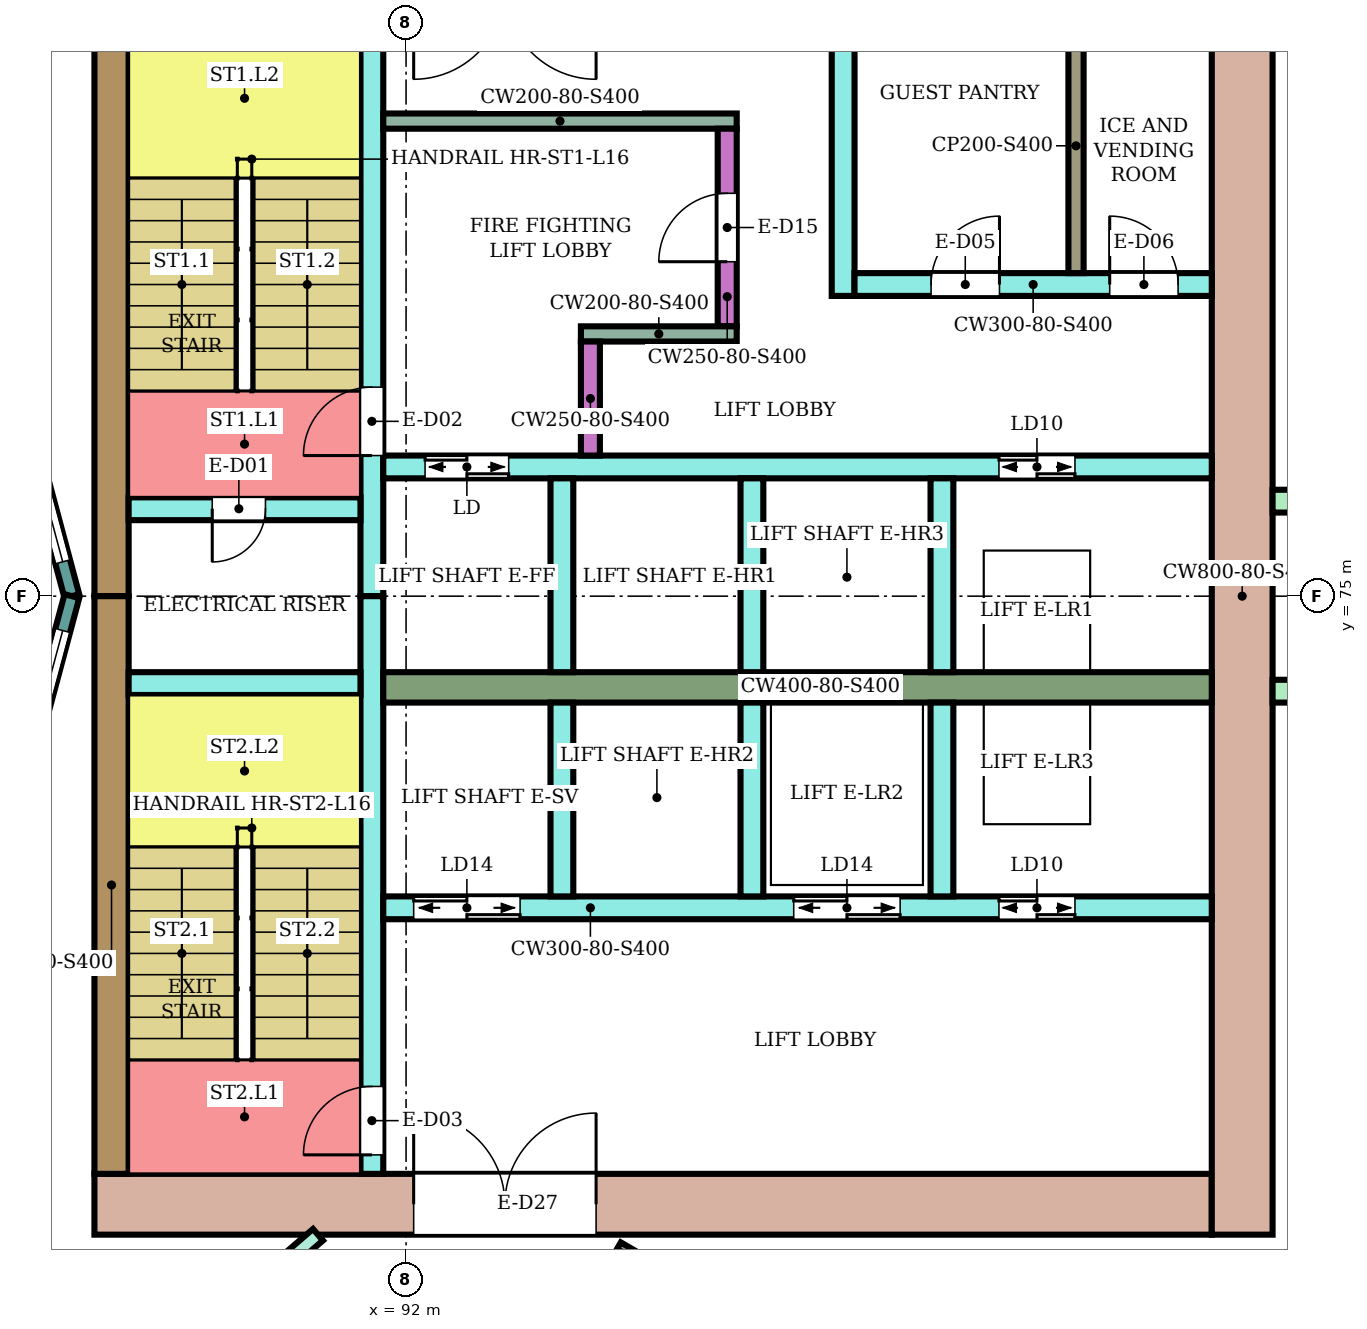
"""IFC4 building model, lengths in metres.
Left out: names, types, materials, properties, quantities, classifications, styles, units other than length and angle.
Written with IfcOpenShell. Run it as: python <this file> out.ifc"""

import sys

from ifc_helpers import new_model, si_unit, direction, frame, frame_2d, origin, place, context, subcontext, project, spatial, rectangle, extrude, element, fill, save


model = new_model("IFC4")
c1 = context("Model", 3, precision=1e-05, world=origin(), true_north=direction((0.0, 1.0)))
c2 = subcontext(c1, "Body", "Model", "MODEL_VIEW")
j1 = project(units=[si_unit("LENGTHUNIT", "METRE"), si_unit("PLANEANGLEUNIT", "RADIAN")], contexts=[c1])
p1 = place(None, origin())
s1 = spatial("IfcSite", under=j1, at=p1, CompositionType="ELEMENT")
p2 = place(p1, origin())
s2 = spatial("IfcBuilding", under=s1, at=p2, CompositionType="ELEMENT")
p3 = place(p2, frame((0.0, 0.0, 70.6)))
s3 = spatial("IfcBuildingStorey", under=s2, at=p3, CompositionType="ELEMENT", Elevation=70.6)
p4 = place(p3, frame((87.9, 67.0, 0.0), z_axis=(0.0, 0.0, 1.0), x_axis=(1.0, 0.0, 0.0)))
e1 = element("IfcWall", 1, at=p4, inside=s3, PredefinedType="SHEAR", context=c2, shape_type="SweptSolid", body=[
    extrude(rectangle(XDim=14.7, YDim=0.8, at=frame_2d((7.35, 0.0))), origin(), (0.0, 0.0, 1.0), 3.4),
])
p5 = place(p4, frame((4.2, 0.0, 0.0)))
e2 = element("IfcOpeningElement", 2, at=p5, cuts=e1, PredefinedType="OPENING", context=c2, shape_type="SweptSolid", body=[
    extrude(rectangle(XDim=2.4, YDim=2.4, at=frame_2d((1.2, 1.2))), frame((0.0, 0.41, 0.0), z_axis=(0.0, -1.0, 0.0), x_axis=(1.0, 0.0, 0.0)), (0.0, 0.0, 1.0), 0.82),
])
for number, where, z_axis, x_axis in (
    (3, (88.125, 75.0, 0.0), (0.0, 0.0, 1.0), (0.0, 1.0, 0.0)),
    (4, (88.125, 67.4, 0.0), (0.0, 0.0, 1.0), (0.0, 1.0, 0.0)),
):
    element("IfcWall", number, at=place(p3, frame(where, z_axis=z_axis, x_axis=x_axis)), inside=s3, PredefinedType="SHEAR", context=c2, shape_type="SweptSolid", body=[
        extrude(rectangle(XDim=7.6, YDim=0.45, at=frame_2d((3.8, 0.0))), origin(), (0.0, 0.0, 1.0), 3.4),
    ])
p6 = place(p3, frame((103.0, 66.6, 0.0), z_axis=(0.0, 0.0, 1.0), x_axis=(0.0, 1.0, 0.0)))
e5 = element("IfcWall", 5, at=p6, inside=s3, PredefinedType="SHEAR", context=c2, shape_type="SweptSolid", body=[
    extrude(rectangle(XDim=16.8, YDim=0.8, at=frame_2d((8.4, 0.0))), origin(), (0.0, 0.0, 1.0), 3.4),
])
p7 = place(p3, frame((91.55, 75.0, 0.0), z_axis=(0.0, 0.0, 1.0), x_axis=(0.0, 1.0, 0.0)))
e6 = element("IfcWall", 6, at=p7, inside=s3, PredefinedType="SHEAR", context=c2, shape_type="SweptSolid", body=[
    extrude(rectangle(XDim=7.6, YDim=0.3, at=frame_2d((3.8, 0.0))), origin(), (0.0, 0.0, 1.0), 3.4),
])
p8 = place(p7, frame((1.85, 0.0, 0.0)))
e7 = element("IfcOpeningElement", 7, at=p8, cuts=e6, PredefinedType="OPENING", context=c2, shape_type="SweptSolid", body=[
    extrude(rectangle(XDim=0.9, YDim=2.1, at=frame_2d((0.45, 1.05))), frame((0.0, 0.16, 0.0), z_axis=(0.0, -1.0, 0.0), x_axis=(1.0, 0.0, 0.0)), (0.0, 0.0, 1.0), 0.32),
])
p9 = place(p3, frame((91.55, 67.4, 0.0), z_axis=(0.0, 0.0, 1.0), x_axis=(0.0, 1.0, 0.0)))
e8 = element("IfcWall", 8, at=p9, inside=s3, PredefinedType="SHEAR", context=c2, shape_type="SweptSolid", body=[
    extrude(rectangle(XDim=7.6, YDim=0.3, at=frame_2d((3.8, 0.0))), origin(), (0.0, 0.0, 1.0), 3.4),
])
p10 = place(p9, frame((0.25, 0.0, 0.0)))
e9 = element("IfcOpeningElement", 9, at=p10, cuts=e8, PredefinedType="OPENING", context=c2, shape_type="SweptSolid", body=[
    extrude(rectangle(XDim=0.9, YDim=2.1, at=frame_2d((0.45, 1.05))), frame((0.0, 0.16, 0.0), z_axis=(0.0, -1.0, 0.0), x_axis=(1.0, 0.0, 0.0)), (0.0, 0.0, 1.0), 0.32),
])
p11 = place(p3, frame((88.35, 76.15, 0.0), z_axis=(0.0, 0.0, 1.0), x_axis=(1.0, 0.0, 0.0)))
e10 = element("IfcWall", 10, at=p11, inside=s3, PredefinedType="SHEAR", context=c2, shape_type="SweptSolid", body=[
    extrude(rectangle(XDim=3.05, YDim=0.3, at=frame_2d((1.525, 0.0))), origin(), (0.0, 0.0, 1.0), 3.4),
])
p12 = place(p11, frame((1.1, 0.0, 0.0)))
e11 = element("IfcOpeningElement", 11, at=p12, cuts=e10, PredefinedType="OPENING", context=c2, shape_type="SweptSolid", body=[
    extrude(rectangle(XDim=0.7, YDim=2.0, at=frame_2d((0.35, 1.0))), frame((0.0, 0.16, 0.0), z_axis=(0.0, -1.0, 0.0), x_axis=(1.0, 0.0, 0.0)), (0.0, 0.0, 1.0), 0.32),
])
p13 = place(p3, frame((88.35, 73.85, 0.0), z_axis=(0.0, 0.0, 1.0), x_axis=(1.0, 0.0, 0.0)))
e12 = element("IfcWall", 12, at=p13, inside=s3, PredefinedType="SHEAR", context=c2, shape_type="SweptSolid", body=[
    extrude(rectangle(XDim=3.05, YDim=0.3, at=frame_2d((1.525, 0.0))), origin(), (0.0, 0.0, 1.0), 3.4),
])
p14 = place(p3, frame((91.7, 76.7, 0.0), z_axis=(0.0, 0.0, 1.0), x_axis=(1.0, 0.0, 0.0)))
e13 = element("IfcWall", 13, at=p14, inside=s3, PredefinedType="SHEAR", context=c2, shape_type="SweptSolid", body=[
    extrude(rectangle(XDim=10.9, YDim=0.3, at=frame_2d((5.45, 0.0))), origin(), (0.0, 0.0, 1.0), 3.4),
])
p15 = place(p14, frame((0.55, 0.0, 0.0)))
e14 = element("IfcOpeningElement", 14, at=p15, cuts=e13, PredefinedType="OPENING", context=c2, shape_type="SweptSolid", body=[
    extrude(rectangle(XDim=1.1, YDim=2.1, at=frame_2d((0.55, 1.05))), frame((0.0, 0.16, 0.0), z_axis=(0.0, -1.0, 0.0), x_axis=(1.0, 0.0, 0.0)), (0.0, 0.0, 1.0), 0.32),
])
p16 = place(p14, frame((8.1, 0.0, 0.0)))
e15 = element("IfcOpeningElement", 15, at=p16, cuts=e13, PredefinedType="OPENING", context=c2, shape_type="SweptSolid", body=[
    extrude(rectangle(XDim=1.0, YDim=2.1, at=frame_2d((0.5, 1.05))), frame((0.0, 0.16, 0.0), z_axis=(0.0, -1.0, 0.0), x_axis=(1.0, 0.0, 0.0)), (0.0, 0.0, 1.0), 0.32),
])
p17 = place(p3, frame((91.7, 73.8, 0.0), z_axis=(0.0, 0.0, 1.0), x_axis=(1.0, 0.0, 0.0)))
e16 = element("IfcWall", 16, at=p17, inside=s3, PredefinedType="SHEAR", context=c2, shape_type="SweptSolid", body=[
    extrude(rectangle(XDim=10.9, YDim=0.4, at=frame_2d((5.45, 0.0))), origin(), (0.0, 0.0, 1.0), 3.4),
])
p18 = place(p3, frame((91.7, 70.9, 0.0), z_axis=(0.0, 0.0, 1.0), x_axis=(1.0, 0.0, 0.0)))
e17 = element("IfcWall", 17, at=p18, inside=s3, PredefinedType="SHEAR", context=c2, shape_type="SweptSolid", body=[
    extrude(rectangle(XDim=10.9, YDim=0.3, at=frame_2d((5.45, 0.0))), origin(), (0.0, 0.0, 1.0), 3.4),
])
p19 = place(p18, frame((0.4, 0.0, 0.0)))
e18 = element("IfcOpeningElement", 18, at=p19, cuts=e17, PredefinedType="OPENING", context=c2, shape_type="SweptSolid", body=[
    extrude(rectangle(XDim=1.4, YDim=2.1, at=frame_2d((0.7, 1.05))), frame((0.0, 0.16, 0.0), z_axis=(0.0, -1.0, 0.0), x_axis=(1.0, 0.0, 0.0)), (0.0, 0.0, 1.0), 0.32),
])
p20 = place(p18, frame((5.4, 0.0, 0.0)))
e19 = element("IfcOpeningElement", 19, at=p20, cuts=e17, PredefinedType="OPENING", context=c2, shape_type="SweptSolid", body=[
    extrude(rectangle(XDim=1.4, YDim=2.1, at=frame_2d((0.7, 1.05))), frame((0.0, 0.16, 0.0), z_axis=(0.0, -1.0, 0.0), x_axis=(1.0, 0.0, 0.0)), (0.0, 0.0, 1.0), 0.32),
])
p21 = place(p18, frame((8.1, 0.0, 0.0)))
e20 = element("IfcOpeningElement", 20, at=p21, cuts=e17, PredefinedType="OPENING", context=c2, shape_type="SweptSolid", body=[
    extrude(rectangle(XDim=1.0, YDim=2.1, at=frame_2d((0.5, 1.05))), frame((0.0, 0.16, 0.0), z_axis=(0.0, -1.0, 0.0), x_axis=(1.0, 0.0, 0.0)), (0.0, 0.0, 1.0), 0.32),
])
for number, where, z_axis, x_axis in (
    (21, (94.05, 74.0, 0.0), (0.0, 0.0, 1.0), (0.0, 1.0, 0.0)),
    (22, (96.55, 74.0, 0.0), (0.0, 0.0, 1.0), (0.0, 1.0, 0.0)),
    (23, (99.05, 74.0, 0.0), (0.0, 0.0, 1.0), (0.0, 1.0, 0.0)),
    (24, (94.05, 71.05, 0.0), (0.0, 0.0, 1.0), (0.0, 1.0, 0.0)),
    (25, (96.55, 71.05, 0.0), (0.0, 0.0, 1.0), (0.0, 1.0, 0.0)),
    (26, (99.05, 71.05, 0.0), (0.0, 0.0, 1.0), (0.0, 1.0, 0.0)),
):
    element("IfcWall", number, at=place(p3, frame(where, z_axis=z_axis, x_axis=x_axis)), inside=s3, PredefinedType="SHEAR", context=c2, shape_type="SweptSolid", body=[
        extrude(rectangle(XDim=2.55, YDim=0.3, at=frame_2d((1.275, 0.0))), origin(), (0.0, 0.0, 1.0), 3.4),
    ])
p22 = place(p3, frame((91.7, 81.25, 0.0), z_axis=(0.0, 0.0, 1.0), x_axis=(1.0, 0.0, 0.0)))
e27 = element("IfcWall", 27, at=p22, inside=s3, PredefinedType="SHEAR", context=c2, shape_type="SweptSolid", body=[
    extrude(rectangle(XDim=4.65, YDim=0.2, at=frame_2d((2.325, 0.0))), origin(), (0.0, 0.0, 1.0), 3.4),
])
p23 = place(p3, frame((96.225, 78.55, 0.0), z_axis=(0.0, 0.0, 1.0), x_axis=(0.0, 1.0, 0.0)))
e28 = element("IfcWall", 28, at=p23, inside=s3, PredefinedType="SHEAR", context=c2, shape_type="SweptSolid", body=[
    extrude(rectangle(XDim=2.6, YDim=0.25, at=frame_2d((1.3, 0.0))), origin(), (0.0, 0.0, 1.0), 3.4),
])
p24 = place(p23, frame((0.85, 0.0, 0.0)))
e29 = element("IfcOpeningElement", 29, at=p24, cuts=e28, PredefinedType="OPENING", context=c2, shape_type="SweptSolid", body=[
    extrude(rectangle(XDim=0.9, YDim=2.1, at=frame_2d((0.45, 1.05))), frame((0.0, 0.135, 0.0), z_axis=(0.0, -1.0, 0.0), x_axis=(1.0, 0.0, 0.0)), (0.0, 0.0, 1.0), 0.27),
])
p25 = place(p3, frame((94.3, 78.45, 0.0), z_axis=(0.0, 0.0, 1.0), x_axis=(1.0, 0.0, 0.0)))
e30 = element("IfcWall", 30, at=p25, inside=s3, PredefinedType="SHEAR", context=c2, shape_type="SweptSolid", body=[
    extrude(rectangle(XDim=2.05, YDim=0.2, at=frame_2d((1.025, 0.0))), origin(), (0.0, 0.0, 1.0), 3.4),
])
p26 = place(p3, frame((94.425, 76.85, 0.0), z_axis=(0.0, 0.0, 1.0), x_axis=(0.0, 1.0, 0.0)))
e31 = element("IfcWall", 31, at=p26, inside=s3, PredefinedType="SHEAR", context=c2, shape_type="SweptSolid", body=[
    extrude(rectangle(XDim=1.5, YDim=0.25, at=frame_2d((0.75, 0.0))), origin(), (0.0, 0.0, 1.0), 3.4),
])
p27 = place(p3, frame((97.75, 78.95, 0.0), z_axis=(0.0, 0.0, 1.0), x_axis=(0.0, 1.0, 0.0)))
e32 = element("IfcWall", 32, at=p27, inside=s3, PredefinedType="SHEAR", context=c2, shape_type="SweptSolid", body=[
    extrude(rectangle(XDim=3.65, YDim=0.3, at=frame_2d((1.825, 0.0))), origin(), (0.0, 0.0, 1.0), 3.4),
])
p28 = place(p3, frame((97.9, 79.1, 0.0), z_axis=(0.0, 0.0, 1.0), x_axis=(1.0, 0.0, 0.0)))
e33 = element("IfcWall", 33, at=p28, inside=s3, PredefinedType="SHEAR", context=c2, shape_type="SweptSolid", body=[
    extrude(rectangle(XDim=4.7, YDim=0.3, at=frame_2d((2.35, 0.0))), origin(), (0.0, 0.0, 1.0), 3.4),
])
p29 = place(p28, frame((1.007, 0.0, 0.0)))
e34 = element("IfcOpeningElement", 34, at=p29, cuts=e33, PredefinedType="OPENING", context=c2, shape_type="SweptSolid", body=[
    extrude(rectangle(XDim=0.9, YDim=2.1, at=frame_2d((0.45, 1.05))), frame((0.0, 0.16, 0.0), z_axis=(0.0, -1.0, 0.0), x_axis=(1.0, 0.0, 0.0)), (0.0, 0.0, 1.0), 0.32),
])
p30 = place(p28, frame((3.357, 0.0, 0.0)))
e35 = element("IfcOpeningElement", 35, at=p30, cuts=e33, PredefinedType="OPENING", context=c2, shape_type="SweptSolid", body=[
    extrude(rectangle(XDim=0.9, YDim=2.1, at=frame_2d((0.45, 1.05))), frame((0.0, 0.16, 0.0), z_axis=(0.0, -1.0, 0.0), x_axis=(1.0, 0.0, 0.0)), (0.0, 0.0, 1.0), 0.32),
])
for number, where, z_axis, x_axis in (
    (36, (103.4, 73.75, 0.0), (0.0, 0.0, 1.0), (1.0, 0.0, 0.0)),
    (37, (103.4, 76.25, 0.0), (0.0, 0.0, 1.0), (1.0, 0.0, 0.0)),
):
    element("IfcWall", number, at=place(p3, frame(where, z_axis=z_axis, x_axis=x_axis)), inside=s3, PredefinedType="NOTDEFINED", context=c2, shape_type="SweptSolid", body=[
        extrude(rectangle(XDim=2.416, YDim=0.3, at=frame_2d((1.208, 0.0))), origin(), (0.0, 0.0, 1.0), 3.8),
    ])
p31 = place(p3, frame((87.604, 75.0, 0.0), z_axis=(0.0, 0.0, 1.0), x_axis=(-0.258789828301, 0.965933654434, 0.0)))
e38 = element("IfcWall", 38, at=p31, inside=s3, PredefinedType="NOTDEFINED", context=c2, shape_type="SweptSolid", body=[
    extrude(rectangle(XDim=3.936, YDim=0.2, at=frame_2d((1.968, 0.0))), origin(), (0.0, 0.0, 1.0), 3.8),
])
p32 = place(p31, frame((0.468, 0.0, 0.9)))
e39 = element("IfcOpeningElement", 39, at=p32, cuts=e38, PredefinedType="OPENING", context=c2, shape_type="SweptSolid", body=[
    extrude(rectangle(XDim=3.0, YDim=2.3, at=frame_2d((1.5, 1.15))), frame((0.0, 0.11, 0.0), z_axis=(0.0, -1.0, 0.0), x_axis=(1.0, 0.0, 0.0)), (0.0, 0.0, 1.0), 0.22),
])
p33 = place(p3, frame((86.585, 71.198, 0.0), z_axis=(0.0, 0.0, 1.0), x_axis=(0.258789828301, 0.965933654434, 0.0)))
e40 = element("IfcWall", 40, at=p33, inside=s3, PredefinedType="NOTDEFINED", context=c2, shape_type="SweptSolid", body=[
    extrude(rectangle(XDim=3.936, YDim=0.2, at=frame_2d((1.968, 0.0))), origin(), (0.0, 0.0, 1.0), 3.8),
])
p34 = place(p33, frame((0.468, 0.0, 0.9)))
e41 = element("IfcOpeningElement", 41, at=p34, cuts=e40, PredefinedType="OPENING", context=c2, shape_type="SweptSolid", body=[
    extrude(rectangle(XDim=3.0, YDim=2.3, at=frame_2d((1.5, 1.15))), frame((0.0, 0.11, 0.0), z_axis=(0.0, -1.0, 0.0), x_axis=(1.0, 0.0, 0.0)), (0.0, 0.0, 1.0), 0.22),
])
p35 = place(p3, frame((86.877, 63.189, 0.0), z_axis=(0.0, 0.0, 1.0), x_axis=(0.758088707506, 0.652151448325, 0.0)))
e42 = element("IfcWall", 42, at=p35, inside=s3, PredefinedType="PARTITIONING", context=c2, shape_type="SweptSolid", body=[
    extrude(rectangle(XDim=5.229, YDim=0.2, at=frame_2d((2.615, 0.0))), origin(), (0.0, 0.0, 1.0), 3.35),
])
p36 = place(p3, frame((94.8, 66.455, 0.0), z_axis=(0.0, 0.0, 1.0), x_axis=(0.86602264145, -0.500004784474, 0.0)))
e43 = element("IfcWall", 43, at=p36, inside=s3, PredefinedType="PARTITIONING", context=c2, shape_type="SweptSolid", body=[
    extrude(rectangle(XDim=8.708, YDim=0.1, at=frame_2d((4.354, 0.0))), origin(), (0.0, 0.0, 1.0), 3.35),
])
p37 = place(p36, frame((3.879, 0.0, 0.0)))
e44 = element("IfcOpeningElement", 44, at=p37, cuts=e43, PredefinedType="OPENING", context=c2, shape_type="SweptSolid", body=[
    extrude(rectangle(XDim=0.9, YDim=2.1, at=frame_2d((0.45, 1.05))), frame((0.0, 0.06, 0.0), z_axis=(0.0, -1.0, 0.0), x_axis=(1.0, 0.0, 0.0)), (0.0, 0.0, 1.0), 0.12),
])
p38 = place(p3, frame((100.814, 79.25, 0.0), z_axis=(0.0, 0.0, 1.0), x_axis=(0.0, 1.0, 0.0)))
e45 = element("IfcWall", 45, at=p38, inside=s3, PredefinedType="PARTITIONING", context=c2, shape_type="SweptSolid", body=[
    extrude(rectangle(XDim=3.35, YDim=0.2, at=frame_2d((1.675, 0.0))), origin(), (0.0, 0.0, 1.0), 3.4),
])
p39 = place(p32, origin())
e46 = element("IfcWindow", 46, at=p39, inside=s3, PartitioningType="SINGLE_PANEL", PredefinedType="WINDOW", context=c2, shape_type="SweptSolid", body=[
    extrude(rectangle(XDim=3.0, YDim=2.3, at=frame_2d((1.5, 1.15))), frame((0.0, 0.03, 0.0), z_axis=(0.0, -1.0, 0.0), x_axis=(1.0, 0.0, 0.0)), (0.0, 0.0, 1.0), 0.06),
])
fill(e39, e46)
p40 = place(p34, origin())
e47 = element("IfcWindow", 47, at=p40, inside=s3, PartitioningType="SINGLE_PANEL", PredefinedType="WINDOW", context=c2, shape_type="SweptSolid", body=[
    extrude(rectangle(XDim=3.0, YDim=2.3, at=frame_2d((1.5, 1.15))), frame((0.0, 0.03, 0.0), z_axis=(0.0, -1.0, 0.0), x_axis=(1.0, 0.0, 0.0)), (0.0, 0.0, 1.0), 0.06),
])
fill(e41, e47)
p41 = place(p12, frame((0.7, 0.0, 0.0), z_axis=(0.0, 0.0, 1.0), x_axis=(-1.0, 0.0, 0.0)))
e48 = element("IfcDoor", 48, at=p41, inside=s3, OperationType="SINGLE_SWING_RIGHT", PredefinedType="DOOR", context=c2, shape_type="SweptSolid", body=[
    extrude(rectangle(XDim=0.7, YDim=2.0, at=frame_2d((0.35, 1.0))), frame((0.0, 0.025, 0.0), z_axis=(0.0, -1.0, 0.0), x_axis=(1.0, 0.0, 0.0)), (0.0, 0.0, 1.0), 0.05),
])
fill(e11, e48)
p42 = place(p8, origin())
e49 = element("IfcDoor", 49, at=p42, inside=s3, OperationType="SINGLE_SWING_LEFT", PredefinedType="DOOR", context=c2, shape_type="SweptSolid", body=[
    extrude(rectangle(XDim=0.9, YDim=2.1, at=frame_2d((0.45, 1.05))), frame((0.0, 0.025, 0.0), z_axis=(0.0, -1.0, 0.0), x_axis=(1.0, 0.0, 0.0)), (0.0, 0.0, 1.0), 0.05),
])
fill(e7, e49)
p43 = place(p10, origin())
e50 = element("IfcDoor", 50, at=p43, inside=s3, OperationType="SINGLE_SWING_LEFT", PredefinedType="DOOR", context=c2, shape_type="SweptSolid", body=[
    extrude(rectangle(XDim=0.9, YDim=2.1, at=frame_2d((0.45, 1.05))), frame((0.0, 0.025, 0.0), z_axis=(0.0, -1.0, 0.0), x_axis=(1.0, 0.0, 0.0)), (0.0, 0.0, 1.0), 0.05),
])
fill(e9, e50)
p44 = place(p15, origin())
e51 = element("IfcDoor", 51, at=p44, inside=s3, OperationType="DOUBLE_DOOR_SLIDING", PredefinedType="DOOR", context=c2, shape_type="SweptSolid", body=[
    extrude(rectangle(XDim=1.1, YDim=2.1, at=frame_2d((0.55, 1.05))), frame((0.0, 0.025, 0.0), z_axis=(0.0, -1.0, 0.0), x_axis=(1.0, 0.0, 0.0)), (0.0, 0.0, 1.0), 0.05),
])
fill(e14, e51)
p45 = place(p16, origin())
e52 = element("IfcDoor", 52, at=p45, inside=s3, OperationType="DOUBLE_DOOR_SLIDING", PredefinedType="DOOR", context=c2, shape_type="SweptSolid", body=[
    extrude(rectangle(XDim=1.0, YDim=2.1, at=frame_2d((0.5, 1.05))), frame((0.0, 0.025, 0.0), z_axis=(0.0, -1.0, 0.0), x_axis=(1.0, 0.0, 0.0)), (0.0, 0.0, 1.0), 0.05),
])
fill(e15, e52)
p46 = place(p19, origin())
e53 = element("IfcDoor", 53, at=p46, inside=s3, OperationType="DOUBLE_DOOR_SLIDING", PredefinedType="DOOR", context=c2, shape_type="SweptSolid", body=[
    extrude(rectangle(XDim=1.4, YDim=2.1, at=frame_2d((0.7, 1.05))), frame((0.0, 0.025, 0.0), z_axis=(0.0, -1.0, 0.0), x_axis=(1.0, 0.0, 0.0)), (0.0, 0.0, 1.0), 0.05),
])
fill(e18, e53)
p47 = place(p20, origin())
e54 = element("IfcDoor", 54, at=p47, inside=s3, OperationType="DOUBLE_DOOR_SLIDING", PredefinedType="DOOR", context=c2, shape_type="SweptSolid", body=[
    extrude(rectangle(XDim=1.4, YDim=2.1, at=frame_2d((0.7, 1.05))), frame((0.0, 0.025, 0.0), z_axis=(0.0, -1.0, 0.0), x_axis=(1.0, 0.0, 0.0)), (0.0, 0.0, 1.0), 0.05),
])
fill(e19, e54)
p48 = place(p21, origin())
e55 = element("IfcDoor", 55, at=p48, inside=s3, OperationType="DOUBLE_DOOR_SLIDING", PredefinedType="DOOR", context=c2, shape_type="SweptSolid", body=[
    extrude(rectangle(XDim=1.0, YDim=2.1, at=frame_2d((0.5, 1.05))), frame((0.0, 0.025, 0.0), z_axis=(0.0, -1.0, 0.0), x_axis=(1.0, 0.0, 0.0)), (0.0, 0.0, 1.0), 0.05),
])
fill(e20, e55)
p49 = place(p24, origin())
e56 = element("IfcDoor", 56, at=p49, inside=s3, OperationType="SINGLE_SWING_LEFT", PredefinedType="DOOR", context=c2, shape_type="SweptSolid", body=[
    extrude(rectangle(XDim=0.9, YDim=2.1, at=frame_2d((0.45, 1.05))), frame((0.0, 0.025, 0.0), z_axis=(0.0, -1.0, 0.0), x_axis=(1.0, 0.0, 0.0)), (0.0, 0.0, 1.0), 0.05),
])
fill(e29, e56)
p50 = place(p29, origin())
e57 = element("IfcDoor", 57, at=p50, inside=s3, OperationType="SINGLE_SWING_RIGHT", PredefinedType="DOOR", context=c2, shape_type="SweptSolid", body=[
    extrude(rectangle(XDim=0.9, YDim=2.1, at=frame_2d((0.45, 1.05))), frame((0.0, 0.025, 0.0), z_axis=(0.0, -1.0, 0.0), x_axis=(1.0, 0.0, 0.0)), (0.0, 0.0, 1.0), 0.05),
])
fill(e34, e57)
p51 = place(p30, origin())
e58 = element("IfcDoor", 58, at=p51, inside=s3, OperationType="SINGLE_SWING_LEFT", PredefinedType="DOOR", context=c2, shape_type="SweptSolid", body=[
    extrude(rectangle(XDim=0.9, YDim=2.1, at=frame_2d((0.45, 1.05))), frame((0.0, 0.025, 0.0), z_axis=(0.0, -1.0, 0.0), x_axis=(1.0, 0.0, 0.0)), (0.0, 0.0, 1.0), 0.05),
])
fill(e35, e58)
p52 = place(p5, origin())
e59 = element("IfcDoor", 59, at=p52, inside=s3, OperationType="DOUBLE_DOOR_SINGLE_SWING", PredefinedType="DOOR", context=c2, shape_type="SweptSolid", body=[
    extrude(rectangle(XDim=2.4, YDim=2.4, at=frame_2d((1.2, 1.2))), frame((0.0, 0.025, 0.0), z_axis=(0.0, -1.0, 0.0), x_axis=(1.0, 0.0, 0.0)), (0.0, 0.0, 1.0), 0.05),
])
fill(e2, e59)
save(model, sys.argv[1])
